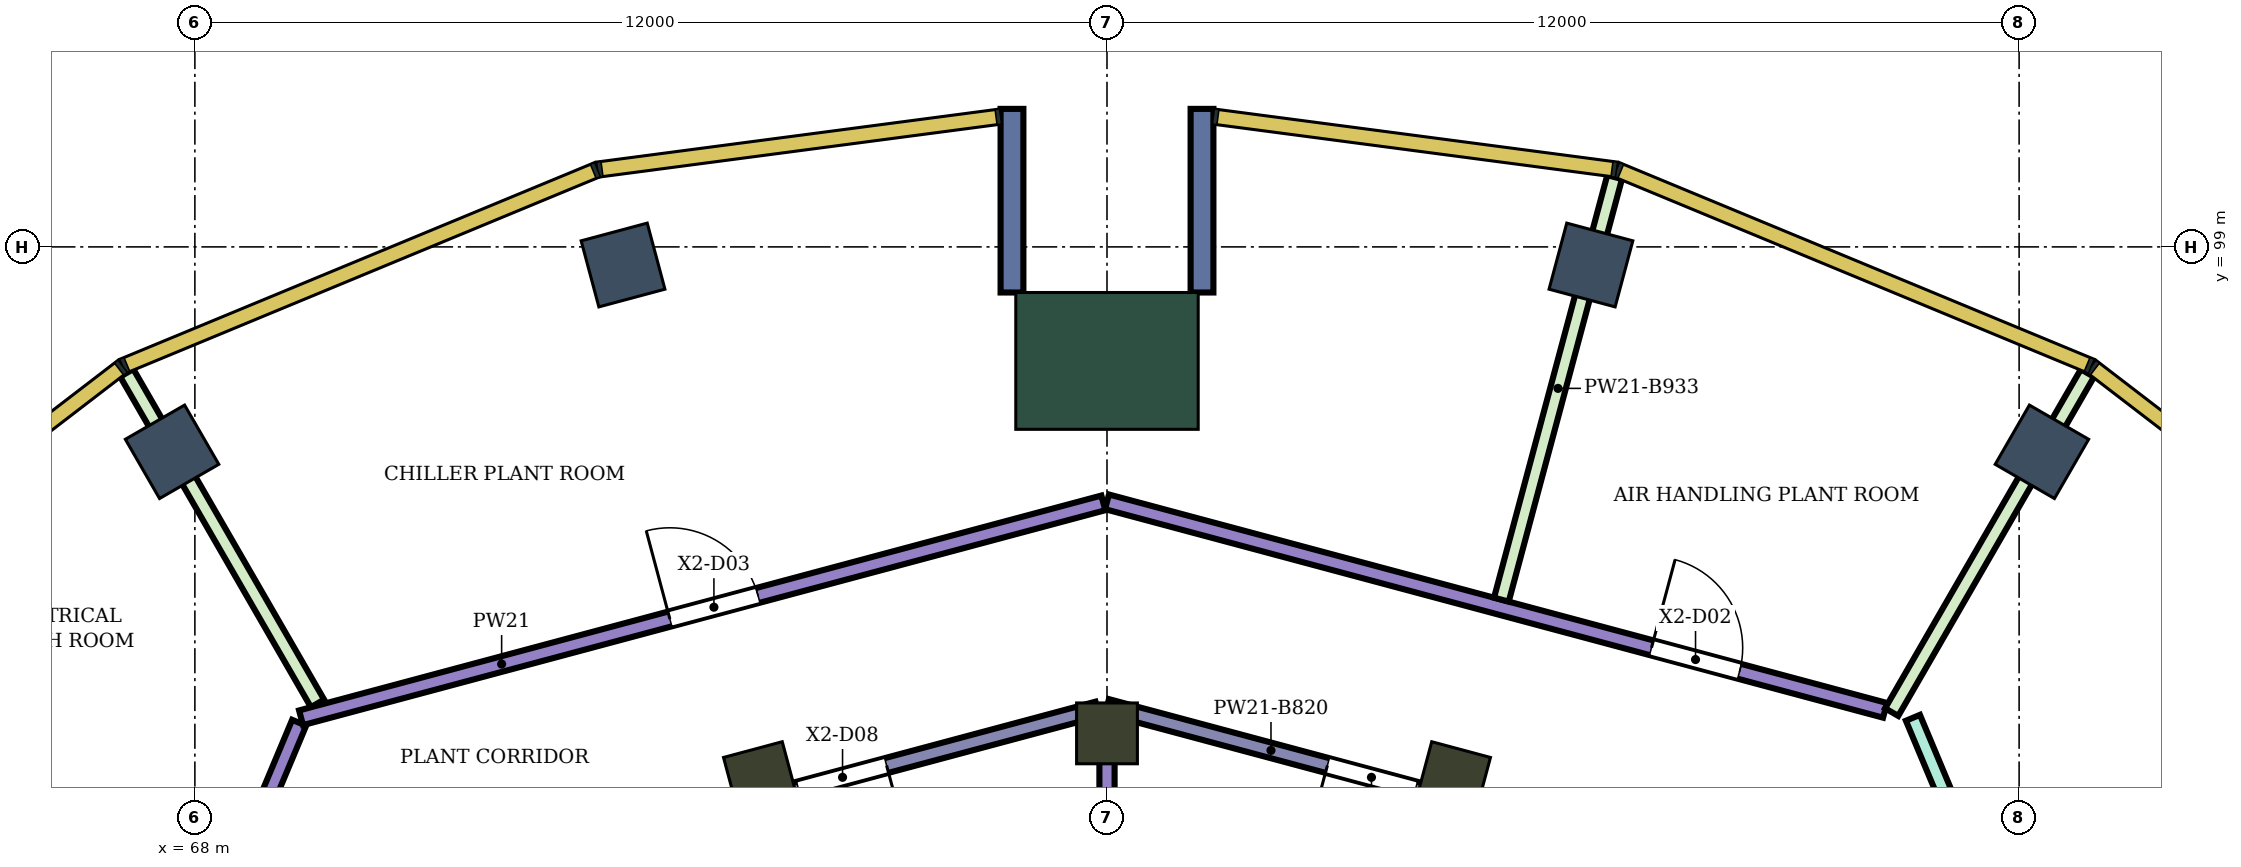
"""IFC4 building model, lengths in metres.
Left out: names, types, materials, properties, quantities, classifications, styles, units other than length and angle.
Written with IfcOpenShell. Run it as: python <this file> out.ifc"""

import sys

from ifc_helpers import new_model, si_unit, direction, frame, frame_2d, origin, origin_2d, place, context, subcontext, project, spatial, rectangle, extrude, element, fill, save


model = new_model("IFC4")
c1 = context("Model", 3, precision=1e-05, world=origin(), true_north=direction((0.0, 1.0)))
c2 = subcontext(c1, "Body", "Model", "MODEL_VIEW")
j1 = project(units=[si_unit("LENGTHUNIT", "METRE"), si_unit("PLANEANGLEUNIT", "RADIAN")], contexts=[c1])
p1 = place(None, origin())
s1 = spatial("IfcSite", under=j1, at=p1, CompositionType="ELEMENT")
p2 = place(p1, origin())
s2 = spatial("IfcBuilding", under=s1, at=p2, CompositionType="ELEMENT")
p3 = place(p2, frame((0.0, 0.0, 206.9)))
s3 = spatial("IfcBuildingStorey", under=s2, at=p3, CompositionType="ELEMENT", Elevation=206.9)
for number, where, z_axis, x_axis in (
    (1, (92.3, 96.304, 0.0), (0.0, 0.0, 1.0), (0.5, 0.866, 0.0)),
    (2, (86.367, 98.762, 0.0), (0.0, 0.0, 1.0), (0.259, 0.966, 0.0)),
    (3, (73.633, 98.762, 0.0), (0.0, 0.0, 1.0), (-0.259, 0.966, 0.0)),
    (4, (67.7, 96.304, 0.0), (0.0, 0.0, 1.0), (-0.5, 0.866, 0.0)),
):
    element("IfcColumn", number, at=place(p3, frame(where, z_axis=z_axis, x_axis=x_axis)), inside=s3, PredefinedType="COLUMN", context=c2, shape_type="SweptSolid", body=[
        extrude(rectangle(XDim=0.9, YDim=0.9, at=origin_2d()), origin(), (0.0, 0.0, 1.0), 5.6),
    ])
for number, where, z_axis, x_axis in (
    (5, (84.555, 92.0, 0.0), (0.0, 0.0, 1.0), (0.259, 0.966, 0.0)),
    (6, (80.0, 92.6, 0.0), (0.0, 0.0, 1.0), (0.0, 1.0, 0.0)),
    (7, (75.445, 92.0, 0.0), (0.0, 0.0, 1.0), (-0.259, 0.966, 0.0)),
):
    element("IfcColumn", number, at=place(p3, frame(where, z_axis=z_axis, x_axis=x_axis)), inside=s3, PredefinedType="COLUMN", context=c2, shape_type="SweptSolid", body=[
        extrude(rectangle(XDim=0.8, YDim=0.8, at=origin_2d()), origin(), (0.0, 0.0, 1.0), 5.6),
    ])
p4 = place(p3, frame((80.0, 97.5, 0.0), z_axis=(0.0, 0.0, 1.0), x_axis=(0.0, 1.0, 0.0)))
e8 = element("IfcColumn", 8, at=p4, inside=s3, PredefinedType="COLUMN", context=c2, shape_type="SweptSolid", body=[
    extrude(rectangle(XDim=1.8, YDim=2.4, at=origin_2d()), origin(), (0.0, 0.0, 1.0), 5.6),
])
for number, where, z_axis, x_axis in (
    (9, (81.25, 98.4, 0.0), (0.0, 0.0, 1.0), (0.0, 1.0, 0.0)),
    (10, (78.75, 98.4, 0.0), (0.0, 0.0, 1.0), (0.0, 1.0, 0.0)),
):
    element("IfcWall", number, at=place(p3, frame(where, z_axis=z_axis, x_axis=x_axis)), inside=s3, PredefinedType="NOTDEFINED", context=c2, shape_type="SweptSolid", body=[
        extrude(rectangle(XDim=2.416, YDim=0.3, at=frame_2d((1.208, 0.0))), origin(), (0.0, 0.0, 1.0), 5.6),
    ])
p5 = place(p3, frame((66.086, 84.9, 0.0), z_axis=(0.0, 0.0, 1.0), x_axis=(0.386558053719, 0.922265076377, 0.0)))
e11 = element("IfcWall", 11, at=p5, inside=s3, PredefinedType="PARTITIONING", context=c2, shape_type="SweptSolid", body=[
    extrude(rectangle(XDim=8.5, YDim=0.2, at=frame_2d((4.25, 0.0))), origin(), (0.0, 0.0, 1.0), 5.15),
])
p6 = place(p5, frame((5.209, 0.0, 0.0)))
e12 = element("IfcOpeningElement", 12, at=p6, cuts=e11, PredefinedType="OPENING", context=c2, shape_type="SweptSolid", body=[
    extrude(rectangle(XDim=1.2, YDim=2.4, at=frame_2d((0.6, 1.2))), frame((0.0, 0.11, 0.0), z_axis=(0.0, -1.0, 0.0), x_axis=(1.0, 0.0, 0.0)), (0.0, 0.0, 1.0), 0.22),
])
p7 = place(p5, frame((0.944, 0.0, 0.0)))
e13 = element("IfcOpeningElement", 13, at=p7, cuts=e11, PredefinedType="OPENING", context=c2, shape_type="SweptSolid", body=[
    extrude(rectangle(XDim=1.2, YDim=2.4, at=frame_2d((0.6, 1.2))), frame((0.0, 0.11, 0.0), z_axis=(0.0, -1.0, 0.0), x_axis=(1.0, 0.0, 0.0)), (0.0, 0.0, 1.0), 0.22),
])
p8 = place(p3, frame((67.104, 97.343, 0.0), z_axis=(0.0, 0.0, 1.0), x_axis=(0.499904868165, -0.866080321209, 0.0)))
e14 = element("IfcWall", 14, at=p8, inside=s3, PredefinedType="PARTITIONING", context=c2, shape_type="SweptSolid", body=[
    extrude(rectangle(XDim=5.021, YDim=0.2, at=frame_2d((2.51, 0.0))), origin(), (0.0, 0.0, 1.0), 4.667),
])
p9 = place(p3, frame((69.397, 92.805, 0.0), z_axis=(0.0, 0.0, 1.0), x_axis=(0.965949547217, 0.258730501163, 0.0)))
e15 = element("IfcWall", 15, at=p9, inside=s3, PredefinedType="PARTITIONING", context=c2, shape_type="SweptSolid", body=[
    extrude(rectangle(XDim=10.927, YDim=0.2, at=frame_2d((5.463, 0.0))), origin(), (0.0, 0.0, 1.0), 5.15),
])
p10 = place(p9, frame((5.023, 0.0, 0.0)))
e16 = element("IfcOpeningElement", 16, at=p10, cuts=e15, PredefinedType="OPENING", context=c2, shape_type="SweptSolid", body=[
    extrude(rectangle(XDim=1.2, YDim=2.4, at=frame_2d((0.6, 1.2))), frame((0.0, 0.11, 0.0), z_axis=(0.0, -1.0, 0.0), x_axis=(1.0, 0.0, 0.0)), (0.0, 0.0, 1.0), 0.22),
])
p11 = place(p3, frame((71.303, 90.624, 0.0), z_axis=(0.0, 0.0, 1.0), x_axis=(0.965935648904, 0.258782383822, 0.0)))
e17 = element("IfcWall", 17, at=p11, inside=s3, PredefinedType="PARTITIONING", context=c2, shape_type="SweptSolid", body=[
    extrude(rectangle(XDim=8.874, YDim=0.2, at=frame_2d((4.437, 0.0))), origin(), (0.0, 0.0, 1.0), 4.78),
])
p12 = place(p11, frame((4.802, 0.0, 0.0)))
e18 = element("IfcOpeningElement", 18, at=p12, cuts=e17, PredefinedType="OPENING", context=c2, shape_type="SweptSolid", body=[
    extrude(rectangle(XDim=1.2, YDim=2.4, at=frame_2d((0.6, 1.2))), frame((0.0, 0.11, 0.0), z_axis=(0.0, -1.0, 0.0), x_axis=(1.0, 0.0, 0.0)), (0.0, 0.0, 1.0), 0.22),
])
p13 = place(p3, frame((80.0, 82.699, 0.0), z_axis=(0.0, 0.0, 1.0), x_axis=(0.0, 1.0, 0.0)))
e19 = element("IfcWall", 19, at=p13, inside=s3, PredefinedType="PARTITIONING", context=c2, shape_type="SweptSolid", body=[
    extrude(rectangle(XDim=10.125, YDim=0.2, at=frame_2d((5.062, 0.0))), origin(), (0.0, 0.0, 1.0), 5.15),
])
p14 = place(p3, frame((80.0, 92.954, 0.0), z_axis=(0.0, 0.0, 1.0), x_axis=(0.965932194462, -0.258795277586, 0.0)))
e20 = element("IfcWall", 20, at=p14, inside=s3, PredefinedType="PARTITIONING", context=c2, shape_type="SweptSolid", body=[
    extrude(rectangle(XDim=8.934, YDim=0.2, at=frame_2d((4.467, 0.0))), origin(), (0.0, 0.0, 1.0), 4.78),
])
p15 = place(p14, frame((3.002, 0.0, 0.0)))
e21 = element("IfcOpeningElement", 21, at=p15, cuts=e20, PredefinedType="OPENING", context=c2, shape_type="SweptSolid", body=[
    extrude(rectangle(XDim=1.2, YDim=2.4, at=frame_2d((0.6, 1.2))), frame((0.0, 0.11, 0.0), z_axis=(0.0, -1.0, 0.0), x_axis=(1.0, 0.0, 0.0)), (0.0, 0.0, 1.0), 0.22),
])
p16 = place(p3, frame((80.0, 95.646, 0.0), z_axis=(0.0, 0.0, 1.0), x_axis=(0.965926044247, -0.258818231672, 0.0)))
e22 = element("IfcWall", 22, at=p16, inside=s3, PredefinedType="PARTITIONING", context=c2, shape_type="SweptSolid", body=[
    extrude(rectangle(XDim=10.597, YDim=0.2, at=frame_2d((5.298, 0.0))), origin(), (0.0, 0.0, 1.0), 5.15),
])
p17 = place(p16, frame((7.416, 0.0, 0.0)))
e23 = element("IfcOpeningElement", 23, at=p17, cuts=e22, PredefinedType="OPENING", context=c2, shape_type="SweptSolid", body=[
    extrude(rectangle(XDim=1.2, YDim=2.4, at=frame_2d((0.6, 1.2))), frame((0.0, 0.11, 0.0), z_axis=(0.0, -1.0, 0.0), x_axis=(1.0, 0.0, 0.0)), (0.0, 0.0, 1.0), 0.22),
])
p18 = place(p3, frame((85.189, 94.359, 0.0), z_axis=(0.0, 0.0, 1.0), x_axis=(0.258871799368, 0.965911689282, 0.0)))
e24 = element("IfcWall", 24, at=p18, inside=s3, PredefinedType="PARTITIONING", context=c2, shape_type="SweptSolid", body=[
    extrude(rectangle(XDim=5.755, YDim=0.2, at=frame_2d((2.877, 0.0))), origin(), (0.0, 0.0, 1.0), 4.667),
])
p19 = place(p3, frame((90.323, 92.88, 0.0), z_axis=(0.0, 0.0, 1.0), x_axis=(0.500028816268, 0.866008766065, 0.0)))
e25 = element("IfcWall", 25, at=p19, inside=s3, PredefinedType="PARTITIONING", context=c2, shape_type="SweptSolid", body=[
    extrude(rectangle(XDim=5.151, YDim=0.2, at=frame_2d((2.575, 0.0))), origin(), (0.0, 0.0, 1.0), 4.667),
])
p20 = place(p3, frame((90.603, 92.805, 0.0), z_axis=(0.0, 0.0, 1.0), x_axis=(0.386317530854, -0.922365852227, 0.0)))
e26 = element("IfcWall", 26, at=p20, inside=s3, PredefinedType="PARTITIONING", context=c2, shape_type="SweptSolid", body=[
    extrude(rectangle(XDim=8.48, YDim=0.2, at=frame_2d((4.24, 0.0))), origin(), (0.0, 0.0, 1.0), 5.15),
])
p21 = place(p20, frame((3.735, 0.0, 0.0)))
e27 = element("IfcOpeningElement", 27, at=p21, cuts=e26, PredefinedType="OPENING", context=c2, shape_type="SweptSolid", body=[
    extrude(rectangle(XDim=1.1, YDim=2.1, at=frame_2d((0.55, 1.05))), frame((0.0, 0.11, 0.0), z_axis=(0.0, -1.0, 0.0), x_axis=(1.0, 0.0, 0.0)), (0.0, 0.0, 1.0), 0.22),
])
p22 = place(p17, origin())
e28 = element("IfcDoor", 28, at=p22, inside=s3, OperationType="SINGLE_SWING_LEFT", PredefinedType="DOOR", context=c2, shape_type="SweptSolid", body=[
    extrude(rectangle(XDim=1.2, YDim=2.4, at=frame_2d((0.6, 1.2))), frame((0.0, 0.025, 0.0), z_axis=(0.0, -1.0, 0.0), x_axis=(1.0, 0.0, 0.0)), (0.0, 0.0, 1.0), 0.05),
])
fill(e23, e28)
p23 = place(p10, origin())
e29 = element("IfcDoor", 29, at=p23, inside=s3, OperationType="SINGLE_SWING_LEFT", PredefinedType="DOOR", context=c2, shape_type="SweptSolid", body=[
    extrude(rectangle(XDim=1.2, YDim=2.4, at=frame_2d((0.6, 1.2))), frame((0.0, 0.025, 0.0), z_axis=(0.0, -1.0, 0.0), x_axis=(1.0, 0.0, 0.0)), (0.0, 0.0, 1.0), 0.05),
])
fill(e16, e29)
p24 = place(p15, frame((1.2, 0.0, 0.0), z_axis=(0.0, 0.0, 1.0), x_axis=(-1.0, 0.0, 0.0)))
e30 = element("IfcDoor", 30, at=p24, inside=s3, OperationType="SINGLE_SWING_RIGHT", PredefinedType="DOOR", context=c2, shape_type="SweptSolid", body=[
    extrude(rectangle(XDim=1.2, YDim=2.4, at=frame_2d((0.6, 1.2))), frame((0.0, 0.025, 0.0), z_axis=(0.0, -1.0, 0.0), x_axis=(1.0, 0.0, 0.0)), (0.0, 0.0, 1.0), 0.05),
])
fill(e21, e30)
p25 = place(p12, frame((1.2, 0.0, 0.0), z_axis=(0.0, 0.0, 1.0), x_axis=(-1.0, 0.0, 0.0)))
e31 = element("IfcDoor", 31, at=p25, inside=s3, OperationType="SINGLE_SWING_LEFT", PredefinedType="DOOR", context=c2, shape_type="SweptSolid", body=[
    extrude(rectangle(XDim=1.2, YDim=2.4, at=frame_2d((0.6, 1.2))), frame((0.0, 0.025, 0.0), z_axis=(0.0, -1.0, 0.0), x_axis=(1.0, 0.0, 0.0)), (0.0, 0.0, 1.0), 0.05),
])
fill(e18, e31)
save(model, sys.argv[1])
